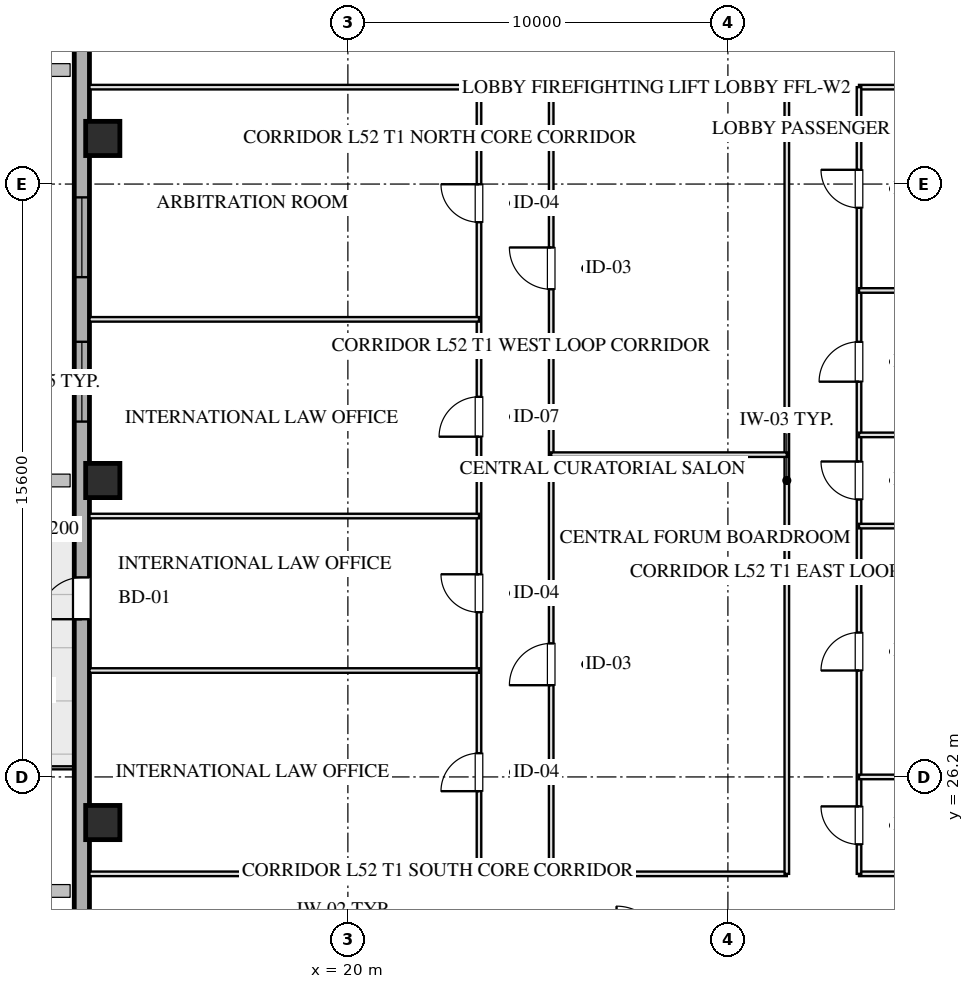
"""IFC4 building model, lengths in metres.
Left out: names, types, materials, properties, quantities, classifications, styles, units other than length and angle.
Written with IfcOpenShell. Run it as: python <this file> out.ifc"""

import sys

from ifc_helpers import new_model, si_unit, direction, frame, frame_2d, origin, origin_2d, place, context, subcontext, project, spatial, rectangle, hollow_rectangle, extrude, element, fill, save


model = new_model("IFC4")
c1 = context("Model", 3, precision=1e-05, world=origin(), true_north=direction((0.0, 1.0)))
c2 = subcontext(c1, "Body", "Model", "MODEL_VIEW")
j1 = project(units=[si_unit("LENGTHUNIT", "METRE"), si_unit("PLANEANGLEUNIT", "RADIAN")], contexts=[c1])
p1 = place(None, origin())
s1 = spatial("IfcSite", under=j1, at=p1, CompositionType="ELEMENT")
p2 = place(p1, origin())
s2 = spatial("IfcBuilding", under=s1, at=p2, CompositionType="ELEMENT")
p3 = place(p2, frame((0.0, 0.0, 195.5)))
s3 = spatial("IfcBuildingStorey", under=s2, at=p3, CompositionType="ELEMENT", Elevation=195.5)
for number, where, z_axis, x_axis in (
    (1, (13.55, 25.0, 0.0), (0.0, 0.0, 1.0), (1.0, 0.0, 0.0)),
    (2, (13.55, 34.0, 0.0), (0.0, 0.0, 1.0), (1.0, 0.0, 0.0)),
    (3, (13.55, 43.0, 0.0), (0.0, 0.0, 1.0), (1.0, 0.0, 0.0)),
):
    element("IfcColumn", number, at=place(p3, frame(where, z_axis=z_axis, x_axis=x_axis)), inside=s3, PredefinedType="COLUMN", context=c2, shape_type="SweptSolid", body=[
        extrude(hollow_rectangle(XDim=0.9, YDim=0.9, WallThickness=0.032, at=origin_2d()), origin(), (0.0, 0.0, 1.0), 3.451),
    ])
p4 = place(p3, frame((13.0, 10.8, 0.0), z_axis=(0.0, 0.0, 1.0), x_axis=(0.0, 1.0, 0.0)))
e4 = element("IfcWall", 4, at=p4, inside=s3, PredefinedType="SOLIDWALL", context=c2, shape_type="SweptSolid", body=[
    extrude(rectangle(XDim=46.4, YDim=0.4, at=frame_2d((23.2, 0.0))), origin(), (0.0, 0.0, 1.0), 2.61),
])
p5 = place(p4, frame((24.75, 0.0, 0.75)))
e5 = element("IfcOpeningElement", 5, at=p5, cuts=e4, PredefinedType="OPENING", context=c2, shape_type="SweptSolid", body=[
    extrude(rectangle(XDim=2.1, YDim=1.46, at=frame_2d((1.05, 0.73))), frame((0.0, 0.21, 0.0), z_axis=(0.0, -1.0, 0.0), x_axis=(1.0, 0.0, 0.0)), (0.0, 0.0, 1.0), 0.42),
])
p6 = place(p4, frame((28.55, 0.0, 0.75)))
e6 = element("IfcOpeningElement", 6, at=p6, cuts=e4, PredefinedType="OPENING", context=c2, shape_type="SweptSolid", body=[
    extrude(rectangle(XDim=2.1, YDim=1.46, at=frame_2d((1.05, 0.73))), frame((0.0, 0.21, 0.0), z_axis=(0.0, -1.0, 0.0), x_axis=(1.0, 0.0, 0.0)), (0.0, 0.0, 1.0), 0.42),
])
p7 = place(p4, frame((19.55, 0.0, 0.0)))
e7 = element("IfcOpeningElement", 7, at=p7, cuts=e4, PredefinedType="OPENING", context=c2, shape_type="SweptSolid", body=[
    extrude(rectangle(XDim=1.1, YDim=2.15, at=frame_2d((0.55, 1.075))), frame((0.0, 0.21, 0.0), z_axis=(0.0, -1.0, 0.0), x_axis=(1.0, 0.0, 0.0)), (0.0, 0.0, 1.0), 0.42),
])
p8 = place(p3, frame((13.2, 23.65, 0.0), z_axis=(0.0, 0.0, 1.0), x_axis=(1.0, 0.0, 0.0)))
e8 = element("IfcWall", 8, at=p8, inside=s3, PredefinedType="PARTITIONING", context=c2, shape_type="SweptSolid", body=[
    extrude(rectangle(XDim=10.25, YDim=0.12, at=frame_2d((5.125, 0.0))), origin(), (0.0, 0.0, 1.0), 3.175),
])
p9 = place(p3, frame((25.35, 23.65, 0.0), z_axis=(0.0, 0.0, 1.0), x_axis=(1.0, 0.0, 0.0)))
e9 = element("IfcWall", 9, at=p9, inside=s3, PredefinedType="PARTITIONING", context=c2, shape_type="SweptSolid", body=[
    extrude(rectangle(XDim=6.2, YDim=0.12, at=frame_2d((3.1, 0.0))), origin(), (0.0, 0.0, 1.0), 3.175),
])
p10 = place(p3, frame((33.45, 23.65, 0.0), z_axis=(0.0, 0.0, 1.0), x_axis=(1.0, 0.0, 0.0)))
e10 = element("IfcWall", 10, at=p10, inside=s3, PredefinedType="PARTITIONING", context=c2, shape_type="SweptSolid", body=[
    extrude(rectangle(XDim=13.35, YDim=0.12, at=frame_2d((6.675, 0.0))), origin(), (0.0, 0.0, 1.0), 3.175),
])
p11 = place(p3, frame((13.2, 44.35, 0.0), z_axis=(0.0, 0.0, 1.0), x_axis=(1.0, 0.0, 0.0)))
e11 = element("IfcWall", 11, at=p11, inside=s3, PredefinedType="PARTITIONING", context=c2, shape_type="SweptSolid", body=[
    extrude(rectangle(XDim=10.25, YDim=0.12, at=frame_2d((5.125, 0.0))), origin(), (0.0, 0.0, 1.0), 3.175),
])
p12 = place(p3, frame((25.35, 44.35, 0.0), z_axis=(0.0, 0.0, 1.0), x_axis=(1.0, 0.0, 0.0)))
e12 = element("IfcWall", 12, at=p12, inside=s3, PredefinedType="PARTITIONING", context=c2, shape_type="SweptSolid", body=[
    extrude(rectangle(XDim=6.2, YDim=0.12, at=frame_2d((3.1, 0.0))), origin(), (0.0, 0.0, 1.0), 3.175),
])
p13 = place(p3, frame((33.45, 44.35, 0.0), z_axis=(0.0, 0.0, 1.0), x_axis=(1.0, 0.0, 0.0)))
e13 = element("IfcWall", 13, at=p13, inside=s3, PredefinedType="PARTITIONING", context=c2, shape_type="SweptSolid", body=[
    extrude(rectangle(XDim=13.35, YDim=0.12, at=frame_2d((6.675, 0.0))), origin(), (0.0, 0.0, 1.0), 3.175),
])
p14 = place(p3, frame((23.45, 23.65, 0.0), z_axis=(0.0, 0.0, 1.0), x_axis=(0.0, 1.0, 0.0)))
e14 = element("IfcWall", 14, at=p14, inside=s3, PredefinedType="PARTITIONING", context=c2, shape_type="SweptSolid", body=[
    extrude(rectangle(XDim=20.7, YDim=0.12, at=frame_2d((10.35, 0.0))), origin(), (0.0, 0.0, 1.0), 3.175),
])
p15 = place(p14, frame((2.175, 0.0, 0.0)))
e15 = element("IfcOpeningElement", 15, at=p15, cuts=e14, PredefinedType="OPENING", context=c2, shape_type="SweptSolid", body=[
    extrude(rectangle(XDim=1.0, YDim=2.05, at=frame_2d((0.5, 1.025))), frame((0.0, 0.07, 0.0), z_axis=(0.0, -1.0, 0.0), x_axis=(1.0, 0.0, 0.0)), (0.0, 0.0, 1.0), 0.14),
])
p16 = place(p14, frame((6.883, 0.0, 0.0)))
e16 = element("IfcOpeningElement", 16, at=p16, cuts=e14, PredefinedType="OPENING", context=c2, shape_type="SweptSolid", body=[
    extrude(rectangle(XDim=1.0, YDim=2.05, at=frame_2d((0.5, 1.025))), frame((0.0, 0.07, 0.0), z_axis=(0.0, -1.0, 0.0), x_axis=(1.0, 0.0, 0.0)), (0.0, 0.0, 1.0), 0.14),
])
p17 = place(p14, frame((11.502, 0.0, 0.0)))
e17 = element("IfcOpeningElement", 17, at=p17, cuts=e14, PredefinedType="OPENING", context=c2, shape_type="SweptSolid", body=[
    extrude(rectangle(XDim=1.05, YDim=2.05, at=frame_2d((0.525, 1.025))), frame((0.0, 0.07, 0.0), z_axis=(0.0, -1.0, 0.0), x_axis=(1.0, 0.0, 0.0)), (0.0, 0.0, 1.0), 0.14),
])
p18 = place(p14, frame((17.145, 0.0, 0.0)))
e18 = element("IfcOpeningElement", 18, at=p18, cuts=e14, PredefinedType="OPENING", context=c2, shape_type="SweptSolid", body=[
    extrude(rectangle(XDim=1.0, YDim=2.05, at=frame_2d((0.5, 1.025))), frame((0.0, 0.07, 0.0), z_axis=(0.0, -1.0, 0.0), x_axis=(1.0, 0.0, 0.0)), (0.0, 0.0, 1.0), 0.14),
])
p19 = place(p3, frame((25.35, 23.65, 0.0), z_axis=(0.0, 0.0, 1.0), x_axis=(0.0, 1.0, 0.0)))
e19 = element("IfcWall", 19, at=p19, inside=s3, PredefinedType="PARTITIONING", context=c2, shape_type="SweptSolid", body=[
    extrude(rectangle(XDim=20.7, YDim=0.12, at=frame_2d((10.35, 0.0))), origin(), (0.0, 0.0, 1.0), 3.175),
])
p20 = place(p19, frame((4.963, 0.0, 0.0)))
e20 = element("IfcOpeningElement", 20, at=p20, cuts=e19, PredefinedType="OPENING", context=c2, shape_type="SweptSolid", body=[
    extrude(rectangle(XDim=1.1, YDim=2.05, at=frame_2d((0.55, 1.025))), frame((0.0, 0.07, 0.0), z_axis=(0.0, -1.0, 0.0), x_axis=(1.0, 0.0, 0.0)), (0.0, 0.0, 1.0), 0.14),
])
p21 = place(p19, frame((15.382, 0.0, 0.0)))
e21 = element("IfcOpeningElement", 21, at=p21, cuts=e19, PredefinedType="OPENING", context=c2, shape_type="SweptSolid", body=[
    extrude(rectangle(XDim=1.1, YDim=2.05, at=frame_2d((0.55, 1.025))), frame((0.0, 0.07, 0.0), z_axis=(0.0, -1.0, 0.0), x_axis=(1.0, 0.0, 0.0)), (0.0, 0.0, 1.0), 0.14),
])
p22 = place(p3, frame((31.55, 23.65, 0.0), z_axis=(0.0, 0.0, 1.0), x_axis=(0.0, 1.0, 0.0)))
e22 = element("IfcWall", 22, at=p22, inside=s3, PredefinedType="PARTITIONING", context=c2, shape_type="SweptSolid", body=[
    extrude(rectangle(XDim=20.7, YDim=0.12, at=frame_2d((10.35, 0.0))), origin(), (0.0, 0.0, 1.0), 3.175),
])
p23 = place(p3, frame((33.45, 23.65, 0.0), z_axis=(0.0, 0.0, 1.0), x_axis=(0.0, 1.0, 0.0)))
e23 = element("IfcWall", 23, at=p23, inside=s3, PredefinedType="PARTITIONING", context=c2, shape_type="SweptSolid", body=[
    extrude(rectangle(XDim=20.7, YDim=0.12, at=frame_2d((10.35, 0.0))), origin(), (0.0, 0.0, 1.0), 3.175),
])
p24 = place(p23, frame((0.775, 0.0, 0.0)))
e24 = element("IfcOpeningElement", 24, at=p24, cuts=e23, PredefinedType="OPENING", context=c2, shape_type="SweptSolid", body=[
    extrude(rectangle(XDim=1.0, YDim=2.05, at=frame_2d((0.5, 1.025))), frame((0.0, 0.07, 0.0), z_axis=(0.0, -1.0, 0.0), x_axis=(1.0, 0.0, 0.0)), (0.0, 0.0, 1.0), 0.14),
])
p25 = place(p23, frame((5.35, 0.0, 0.0)))
e25 = element("IfcOpeningElement", 25, at=p25, cuts=e23, PredefinedType="OPENING", context=c2, shape_type="SweptSolid", body=[
    extrude(rectangle(XDim=1.0, YDim=2.05, at=frame_2d((0.5, 1.025))), frame((0.0, 0.07, 0.0), z_axis=(0.0, -1.0, 0.0), x_axis=(1.0, 0.0, 0.0)), (0.0, 0.0, 1.0), 0.14),
])
p26 = place(p23, frame((9.85, 0.0, 0.0)))
e26 = element("IfcOpeningElement", 26, at=p26, cuts=e23, PredefinedType="OPENING", context=c2, shape_type="SweptSolid", body=[
    extrude(rectangle(XDim=1.0, YDim=2.05, at=frame_2d((0.5, 1.025))), frame((0.0, 0.07, 0.0), z_axis=(0.0, -1.0, 0.0), x_axis=(1.0, 0.0, 0.0)), (0.0, 0.0, 1.0), 0.14),
])
p27 = place(p23, frame((12.95, 0.0, 0.0)))
e27 = element("IfcOpeningElement", 27, at=p27, cuts=e23, PredefinedType="OPENING", context=c2, shape_type="SweptSolid", body=[
    extrude(rectangle(XDim=1.05, YDim=2.05, at=frame_2d((0.525, 1.025))), frame((0.0, 0.07, 0.0), z_axis=(0.0, -1.0, 0.0), x_axis=(1.0, 0.0, 0.0)), (0.0, 0.0, 1.0), 0.14),
])
p28 = place(p23, frame((17.525, 0.0, 0.0)))
e28 = element("IfcOpeningElement", 28, at=p28, cuts=e23, PredefinedType="OPENING", context=c2, shape_type="SweptSolid", body=[
    extrude(rectangle(XDim=1.0, YDim=2.05, at=frame_2d((0.5, 1.025))), frame((0.0, 0.07, 0.0), z_axis=(0.0, -1.0, 0.0), x_axis=(1.0, 0.0, 0.0)), (0.0, 0.0, 1.0), 0.14),
])
p29 = place(p3, frame((25.35, 34.68, 0.0), z_axis=(0.0, 0.0, 1.0), x_axis=(1.0, 0.0, 0.0)))
e29 = element("IfcWall", 29, at=p29, inside=s3, PredefinedType="PARTITIONING", context=c2, shape_type="SweptSolid", body=[
    extrude(rectangle(XDim=6.2, YDim=0.12, at=frame_2d((3.1, 0.0))), origin(), (0.0, 0.0, 1.0), 3.175),
])
for number, where, z_axis, x_axis in (
    (30, (13.2, 29.0, 0.0), (0.0, 0.0, 1.0), (1.0, 0.0, 0.0)),
    (31, (13.2, 33.065, 0.0), (0.0, 0.0, 1.0), (1.0, 0.0, 0.0)),
    (32, (13.2, 38.24, 0.0), (0.0, 0.0, 1.0), (1.0, 0.0, 0.0)),
):
    element("IfcWall", number, at=place(p3, frame(where, z_axis=z_axis, x_axis=x_axis)), inside=s3, PredefinedType="PARTITIONING", context=c2, shape_type="SweptSolid", body=[
        extrude(rectangle(XDim=10.25, YDim=0.12, at=frame_2d((5.125, 0.0))), origin(), (0.0, 0.0, 1.0), 3.175),
    ])
for number, where, z_axis, x_axis in (
    (33, (33.45, 26.2, 0.0), (0.0, 0.0, 1.0), (1.0, 0.0, 0.0)),
    (34, (33.45, 32.8, 0.0), (0.0, 0.0, 1.0), (1.0, 0.0, 0.0)),
    (35, (33.45, 35.2, 0.0), (0.0, 0.0, 1.0), (1.0, 0.0, 0.0)),
    (36, (33.45, 39.0, 0.0), (0.0, 0.0, 1.0), (1.0, 0.0, 0.0)),
):
    element("IfcWall", number, at=place(p3, frame(where, z_axis=z_axis, x_axis=x_axis)), inside=s3, PredefinedType="PARTITIONING", context=c2, shape_type="SweptSolid", body=[
        extrude(rectangle(XDim=13.35, YDim=0.12, at=frame_2d((6.675, 0.0))), origin(), (0.0, 0.0, 1.0), 3.175),
    ])
p30 = place(p5, origin())
e37 = element("IfcWindow", 37, at=p30, inside=s3, PartitioningType="TRIPLE_PANEL_VERTICAL", PredefinedType="WINDOW", context=c2, shape_type="SweptSolid", body=[
    extrude(rectangle(XDim=2.1, YDim=1.46, at=frame_2d((1.05, 0.73))), frame((0.0, 0.03, 0.0), z_axis=(0.0, -1.0, 0.0), x_axis=(1.0, 0.0, 0.0)), (0.0, 0.0, 1.0), 0.06),
])
fill(e5, e37)
p31 = place(p6, origin())
e38 = element("IfcWindow", 38, at=p31, inside=s3, PartitioningType="TRIPLE_PANEL_VERTICAL", PredefinedType="WINDOW", context=c2, shape_type="SweptSolid", body=[
    extrude(rectangle(XDim=2.1, YDim=1.46, at=frame_2d((1.05, 0.73))), frame((0.0, 0.03, 0.0), z_axis=(0.0, -1.0, 0.0), x_axis=(1.0, 0.0, 0.0)), (0.0, 0.0, 1.0), 0.06),
])
fill(e6, e38)
p32 = place(p7, origin())
e39 = element("IfcDoor", 39, at=p32, inside=s3, OperationType="SINGLE_SWING_LEFT", PredefinedType="DOOR", context=c2, shape_type="SweptSolid", body=[
    extrude(rectangle(XDim=1.1, YDim=2.15, at=frame_2d((0.55, 1.075))), frame((0.0, 0.025, 0.0), z_axis=(0.0, -1.0, 0.0), x_axis=(1.0, 0.0, 0.0)), (0.0, 0.0, 1.0), 0.05),
])
fill(e7, e39)
p33 = place(p15, origin())
e40 = element("IfcDoor", 40, at=p33, inside=s3, OperationType="SINGLE_SWING_LEFT", PredefinedType="DOOR", context=c2, shape_type="SweptSolid", body=[
    extrude(rectangle(XDim=1.0, YDim=2.05, at=frame_2d((0.5, 1.025))), frame((0.0, 0.025, 0.0), z_axis=(0.0, -1.0, 0.0), x_axis=(1.0, 0.0, 0.0)), (0.0, 0.0, 1.0), 0.05),
])
fill(e15, e40)
p34 = place(p16, origin())
e41 = element("IfcDoor", 41, at=p34, inside=s3, OperationType="SINGLE_SWING_RIGHT", PredefinedType="DOOR", context=c2, shape_type="SweptSolid", body=[
    extrude(rectangle(XDim=1.0, YDim=2.05, at=frame_2d((0.5, 1.025))), frame((0.0, 0.025, 0.0), z_axis=(0.0, -1.0, 0.0), x_axis=(1.0, 0.0, 0.0)), (0.0, 0.0, 1.0), 0.05),
])
fill(e16, e41)
p35 = place(p17, origin())
e42 = element("IfcDoor", 42, at=p35, inside=s3, OperationType="SINGLE_SWING_LEFT", PredefinedType="DOOR", context=c2, shape_type="SweptSolid", body=[
    extrude(rectangle(XDim=1.05, YDim=2.05, at=frame_2d((0.525, 1.025))), frame((0.0, 0.025, 0.0), z_axis=(0.0, -1.0, 0.0), x_axis=(1.0, 0.0, 0.0)), (0.0, 0.0, 1.0), 0.05),
])
fill(e17, e42)
p36 = place(p18, origin())
e43 = element("IfcDoor", 43, at=p36, inside=s3, OperationType="SINGLE_SWING_RIGHT", PredefinedType="DOOR", context=c2, shape_type="SweptSolid", body=[
    extrude(rectangle(XDim=1.0, YDim=2.05, at=frame_2d((0.5, 1.025))), frame((0.0, 0.025, 0.0), z_axis=(0.0, -1.0, 0.0), x_axis=(1.0, 0.0, 0.0)), (0.0, 0.0, 1.0), 0.05),
])
fill(e18, e43)
p37 = place(p20, origin())
e44 = element("IfcDoor", 44, at=p37, inside=s3, OperationType="SINGLE_SWING_LEFT", PredefinedType="DOOR", context=c2, shape_type="SweptSolid", body=[
    extrude(rectangle(XDim=1.1, YDim=2.05, at=frame_2d((0.55, 1.025))), frame((0.0, 0.025, 0.0), z_axis=(0.0, -1.0, 0.0), x_axis=(1.0, 0.0, 0.0)), (0.0, 0.0, 1.0), 0.05),
])
fill(e20, e44)
p38 = place(p21, origin())
e45 = element("IfcDoor", 45, at=p38, inside=s3, OperationType="SINGLE_SWING_RIGHT", PredefinedType="DOOR", context=c2, shape_type="SweptSolid", body=[
    extrude(rectangle(XDim=1.1, YDim=2.05, at=frame_2d((0.55, 1.025))), frame((0.0, 0.025, 0.0), z_axis=(0.0, -1.0, 0.0), x_axis=(1.0, 0.0, 0.0)), (0.0, 0.0, 1.0), 0.05),
])
fill(e21, e45)
p39 = place(p24, origin())
e46 = element("IfcDoor", 46, at=p39, inside=s3, OperationType="SINGLE_SWING_RIGHT", PredefinedType="DOOR", context=c2, shape_type="SweptSolid", body=[
    extrude(rectangle(XDim=1.0, YDim=2.05, at=frame_2d((0.5, 1.025))), frame((0.0, 0.025, 0.0), z_axis=(0.0, -1.0, 0.0), x_axis=(1.0, 0.0, 0.0)), (0.0, 0.0, 1.0), 0.05),
])
fill(e24, e46)
p40 = place(p25, origin())
e47 = element("IfcDoor", 47, at=p40, inside=s3, OperationType="SINGLE_SWING_LEFT", PredefinedType="DOOR", context=c2, shape_type="SweptSolid", body=[
    extrude(rectangle(XDim=1.0, YDim=2.05, at=frame_2d((0.5, 1.025))), frame((0.0, 0.025, 0.0), z_axis=(0.0, -1.0, 0.0), x_axis=(1.0, 0.0, 0.0)), (0.0, 0.0, 1.0), 0.05),
])
fill(e25, e47)
p41 = place(p26, origin())
e48 = element("IfcDoor", 48, at=p41, inside=s3, OperationType="SINGLE_SWING_RIGHT", PredefinedType="DOOR", context=c2, shape_type="SweptSolid", body=[
    extrude(rectangle(XDim=1.0, YDim=2.05, at=frame_2d((0.5, 1.025))), frame((0.0, 0.025, 0.0), z_axis=(0.0, -1.0, 0.0), x_axis=(1.0, 0.0, 0.0)), (0.0, 0.0, 1.0), 0.05),
])
fill(e26, e48)
p42 = place(p27, origin())
e49 = element("IfcDoor", 49, at=p42, inside=s3, OperationType="SINGLE_SWING_LEFT", PredefinedType="DOOR", context=c2, shape_type="SweptSolid", body=[
    extrude(rectangle(XDim=1.05, YDim=2.05, at=frame_2d((0.525, 1.025))), frame((0.0, 0.025, 0.0), z_axis=(0.0, -1.0, 0.0), x_axis=(1.0, 0.0, 0.0)), (0.0, 0.0, 1.0), 0.05),
])
fill(e27, e49)
p43 = place(p28, origin())
e50 = element("IfcDoor", 50, at=p43, inside=s3, OperationType="SINGLE_SWING_RIGHT", PredefinedType="DOOR", context=c2, shape_type="SweptSolid", body=[
    extrude(rectangle(XDim=1.0, YDim=2.05, at=frame_2d((0.5, 1.025))), frame((0.0, 0.025, 0.0), z_axis=(0.0, -1.0, 0.0), x_axis=(1.0, 0.0, 0.0)), (0.0, 0.0, 1.0), 0.05),
])
fill(e28, e50)
save(model, sys.argv[1])
